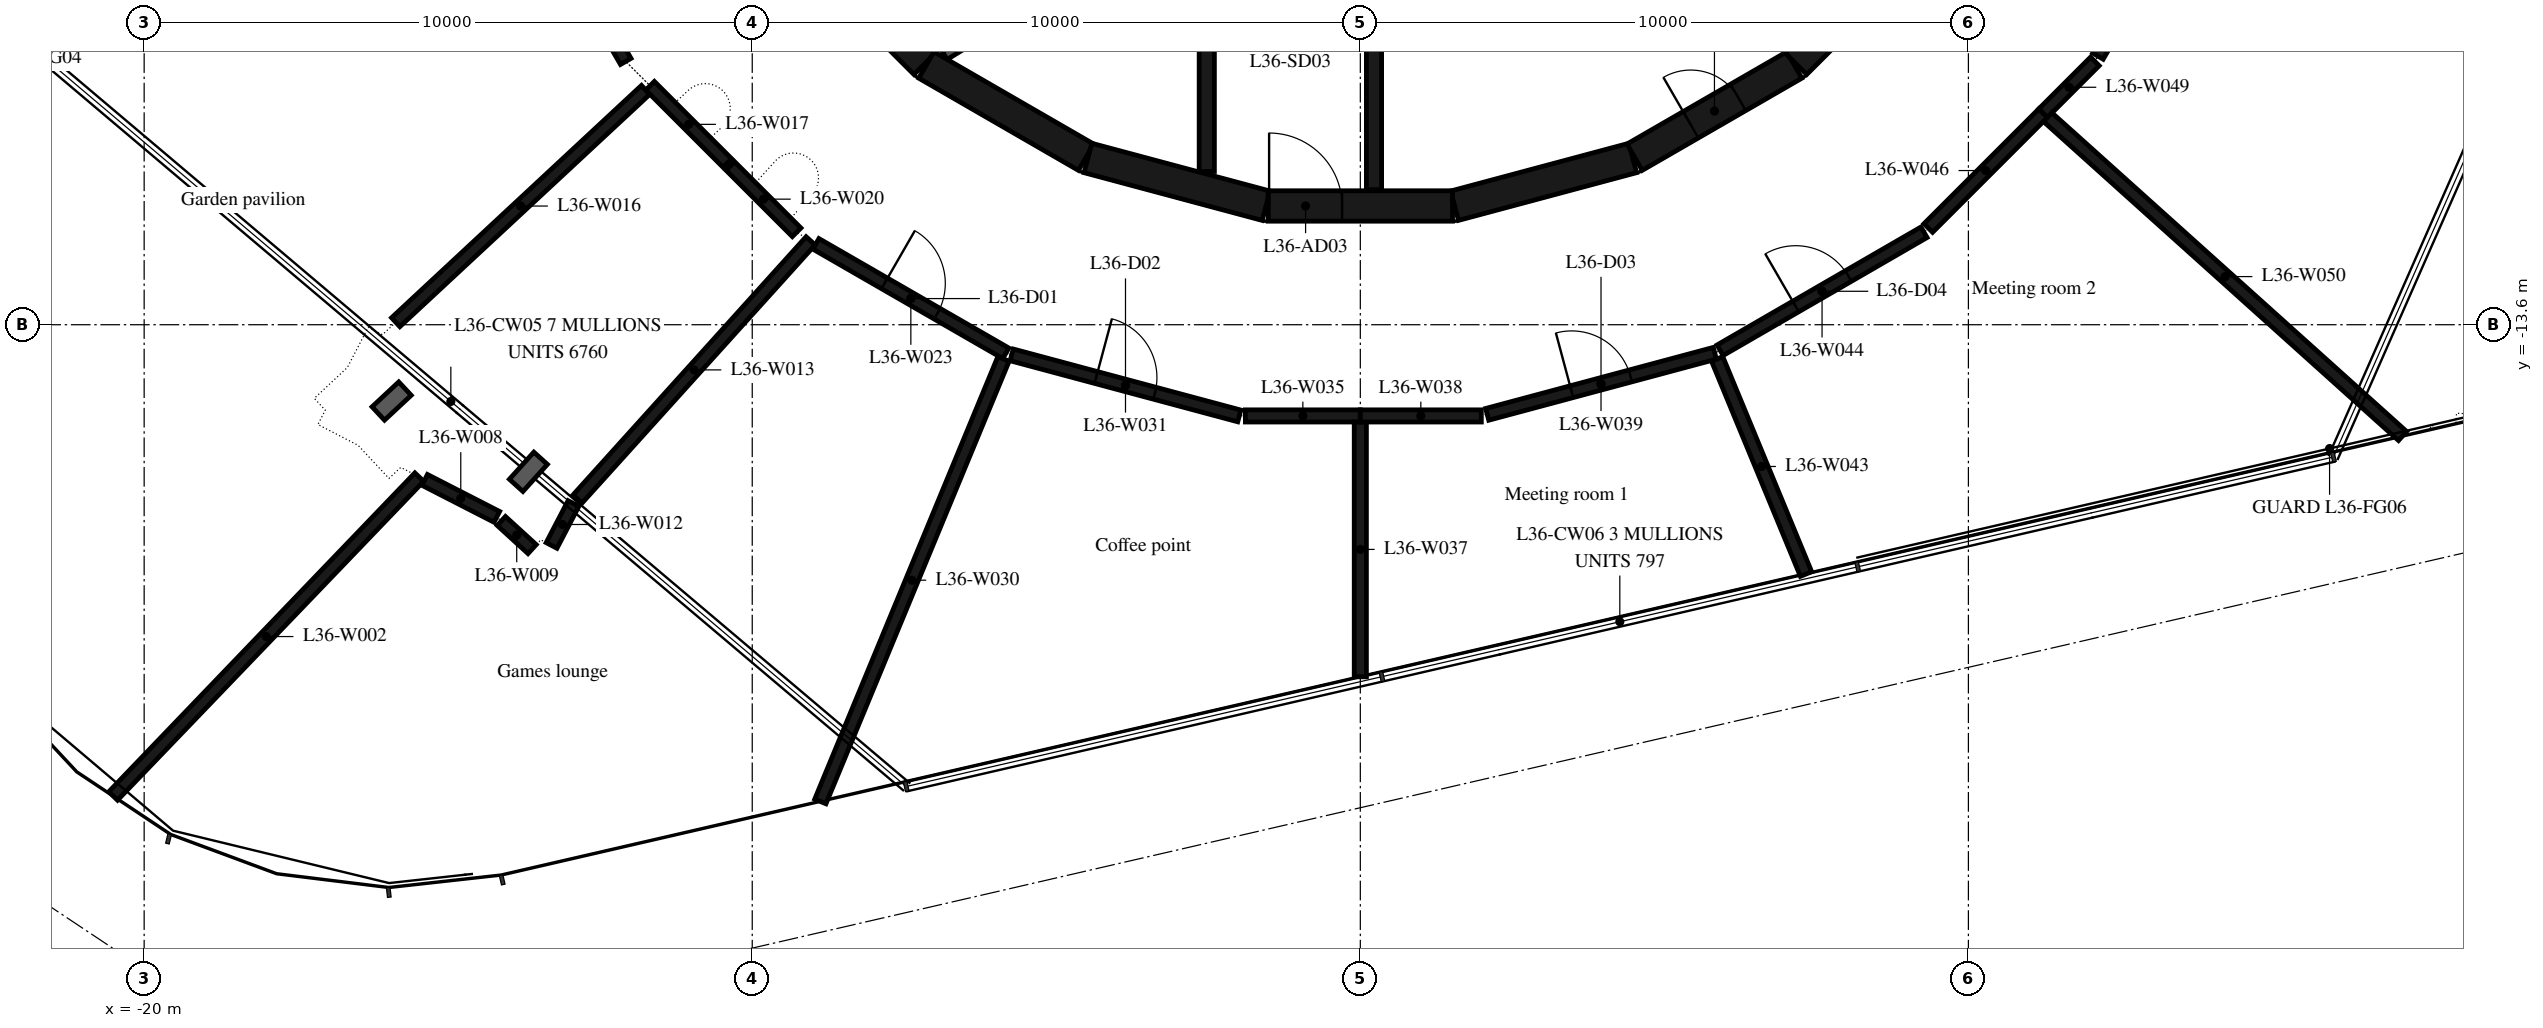
"""IFC4 building model, lengths in metres.
Left out: names, types, materials, properties, quantities, classifications, styles, units other than length and angle.
Written with IfcOpenShell. Run it as: python <this file> out.ifc"""

import sys

from ifc_helpers import new_model, si_unit, direction, frame, frame_2d, origin, place, context, subcontext, project, spatial, rectangle, extrude, element, fill, save


model = new_model("IFC4")
c1 = context("Model", 3, precision=1e-05, world=origin(), true_north=direction((0.0, 1.0)))
c2 = subcontext(c1, "Body", "Model", "MODEL_VIEW")
j1 = project(units=[si_unit("LENGTHUNIT", "METRE"), si_unit("PLANEANGLEUNIT", "RADIAN")], contexts=[c1])
p1 = place(None, origin())
s1 = spatial("IfcSite", under=j1, at=p1, CompositionType="ELEMENT")
p2 = place(p1, origin())
s2 = spatial("IfcBuilding", under=s1, at=p2, CompositionType="ELEMENT")
p3 = place(p2, frame((0.0, 0.0, 144.9)))
s3 = spatial("IfcBuildingStorey", under=s2, at=p3, CompositionType="ELEMENT", Elevation=144.9)
p4 = place(p3, frame((1.55, -11.643, 0.0), z_axis=(0.0, 0.0, 1.0), x_axis=(0.965948410781, 0.258734743916, 0.0)))
e1 = element("IfcWall", 1, at=p4, inside=s3, PredefinedType="SHEAR", context=c2, shape_type="SweptSolid", body=[
    extrude(rectangle(XDim=3.033, YDim=0.5, at=frame_2d((1.516, 0.0))), origin(), (0.0, 0.0, 1.0), 6.35),
])
p5 = place(p3, frame((4.51, -10.845, 0.0), z_axis=(0.0, 0.0, 1.0), x_axis=(0.865975092491, 0.500087131594, 0.0)))
e2 = element("IfcWall", 2, at=p5, inside=s3, PredefinedType="SHEAR", context=c2, shape_type="SweptSolid", body=[
    extrude(rectangle(XDim=3.033, YDim=0.5, at=frame_2d((1.516, 0.0))), origin(), (0.0, 0.0, 1.0), 6.35),
])
p6 = place(p5, frame((1.066, 0.0, 0.0)))
e3 = element("IfcOpeningElement", 3, at=p6, cuts=e2, PredefinedType="OPENING", context=c2, shape_type="SweptSolid", body=[
    extrude(rectangle(XDim=0.9, YDim=2.1, at=frame_2d((0.45, 1.05))), frame((0.0, 0.26, 0.0), z_axis=(0.0, -1.0, 0.0), x_axis=(1.0, 0.0, 0.0)), (0.0, 0.0, 1.0), 0.52),
])
for number, where, z_axis, x_axis in (
    (4, (7.164, -9.308, 0.0), (0.0, 0.0, 1.0), (0.707, 0.707, 0.0)),
    (5, (-9.308, -7.164, 0.0), (0.0, 0.0, 1.0), (0.707, -0.707, 0.0)),
):
    element("IfcWall", number, at=place(p3, frame(where, z_axis=z_axis, x_axis=x_axis)), inside=s3, PredefinedType="SHEAR", context=c2, shape_type="SweptSolid", body=[
        extrude(rectangle(XDim=3.032, YDim=0.5, at=frame_2d((1.516, 0.0))), origin(), (0.0, 0.0, 1.0), 6.35),
    ])
for number, where, z_axis, x_axis in (
    (6, (-7.137, -9.329, 0.0), (0.0, 0.0, 1.0), (0.866, -0.5, 0.0)),
    (7, (-4.479, -10.858, 0.0), (0.0, 0.0, 1.0), (0.966, -0.259, 0.0)),
):
    element("IfcWall", number, at=place(p3, frame(where, z_axis=z_axis, x_axis=x_axis)), inside=s3, PredefinedType="SHEAR", context=c2, shape_type="SweptSolid", body=[
        extrude(rectangle(XDim=3.033, YDim=0.5, at=frame_2d((1.516, 0.0))), origin(), (0.0, 0.0, 1.0), 6.35),
    ])
p7 = place(p3, frame((-1.516, -11.647, 0.0), z_axis=(0.0, 0.0, 1.0), x_axis=(1.0, 0.0, 0.0)))
e8 = element("IfcWall", 8, at=p7, inside=s3, PredefinedType="SHEAR", context=c2, shape_type="SweptSolid", body=[
    extrude(rectangle(XDim=3.033, YDim=0.5, at=frame_2d((1.516, 0.0))), origin(), (0.0, 0.0, 1.0), 6.35),
])
p8 = place(p7, frame((0.016, 0.0, 0.0)))
e9 = element("IfcOpeningElement", 9, at=p8, cuts=e8, PredefinedType="OPENING", context=c2, shape_type="SweptSolid", body=[
    extrude(rectangle(XDim=1.2, YDim=2.1, at=frame_2d((0.6, 1.05))), frame((0.0, 0.26, 0.0), z_axis=(0.0, -1.0, 0.0), x_axis=(1.0, 0.0, 0.0)), (0.0, 0.0, 1.0), 0.52),
])
p9 = place(p3, frame((-2.525, -8.97, 0.0), z_axis=(0.0, 0.0, 1.0), x_axis=(0.0, -1.0, 0.0)))
e10 = element("IfcWall", 10, at=p9, inside=s3, PredefinedType="SHEAR", context=c2, shape_type="SweptSolid", body=[
    extrude(rectangle(XDim=2.11, YDim=0.25, at=frame_2d((1.055, 0.0))), origin(), (0.0, 0.0, 1.0), 6.35),
])
p10 = place(p3, frame((0.225, -8.97, 0.0), z_axis=(0.0, 0.0, 1.0), x_axis=(0.0, -1.0, 0.0)))
e11 = element("IfcWall", 11, at=p10, inside=s3, PredefinedType="SHEAR", context=c2, shape_type="SweptSolid", body=[
    extrude(rectangle(XDim=2.41, YDim=0.25, at=frame_2d((1.205, 0.0))), origin(), (0.0, 0.0, 1.0), 6.35),
])
p11 = place(p3, frame((-2.451, -6.495, 0.0), z_axis=(0.0, 0.0, 1.0), x_axis=(-0.853250115418, -0.521501908471, 0.0)))
e12 = element("IfcWall", 12, at=p11, inside=s3, PredefinedType="PARTITIONING", context=c2, shape_type="SweptSolid", body=[
    extrude(rectangle(XDim=5.137, YDim=0.15, at=frame_2d((2.569, 0.0))), origin(), (0.0, 0.0, 1.0), 6.35),
])
p12 = place(p11, frame((2.119, 0.0, 0.0)))
e13 = element("IfcOpeningElement", 13, at=p12, cuts=e12, PredefinedType="OPENING", context=c2, shape_type="SweptSolid", body=[
    extrude(rectangle(XDim=0.9, YDim=2.1, at=frame_2d((0.45, 1.05))), frame((0.0, 0.085, 0.0), z_axis=(0.0, -1.0, 0.0), x_axis=(1.0, 0.0, 0.0)), (0.0, 0.0, 1.0), 0.17),
])
p13 = place(p3, frame((-15.476, -16.106, 0.0), z_axis=(0.0, 0.0, 1.0), x_axis=(-0.6925353236, -0.72138396542, 0.0)))
e14 = element("IfcWall", 14, at=p13, inside=s3, PredefinedType="PARTITIONING", context=c2, shape_type="SweptSolid", body=[
    extrude(rectangle(XDim=7.27, YDim=0.2, at=frame_2d((3.635, 0.0))), origin(), (0.0, 0.0, 1.0), 6.35),
])
p14 = place(p3, frame((-14.2, -16.76, 0.0), z_axis=(0.0, 0.0, 1.0), x_axis=(-0.88987844473, 0.456197713283, 0.0)))
e15 = element("IfcWall", 15, at=p14, inside=s3, PredefinedType="PARTITIONING", context=c2, shape_type="SweptSolid", body=[
    extrude(rectangle(XDim=1.334, YDim=0.2, at=frame_2d((0.667, 0.0))), origin(), (0.0, 0.0, 1.0), 6.35),
])
p15 = place(p3, frame((-14.126, -16.827, 0.0), z_axis=(0.0, 0.0, 1.0), x_axis=(0.73808453576, -0.674708246631, 0.0)))
e16 = element("IfcWall", 16, at=p15, inside=s3, PredefinedType="PARTITIONING", context=c2, shape_type="SweptSolid", body=[
    extrude(rectangle(XDim=0.686, YDim=0.2, at=frame_2d((0.343, 0.0))), origin(), (0.0, 0.0, 1.0), 6.35),
])
p16 = place(p3, frame((-14.02, -5.917, 0.0), z_axis=(0.0, 0.0, 1.0), x_axis=(0.500733182901, -0.865601686425, 0.0)))
e17 = element("IfcWall", 17, at=p16, inside=s3, PredefinedType="PARTITIONING", context=c2, shape_type="SweptSolid", body=[
    extrude(rectangle(XDim=3.874, YDim=0.2, at=frame_2d((1.937, 0.0))), origin(), (0.0, 0.0, 1.0), 6.35),
])
p17 = place(p16, frame((1.437, 0.0, 0.0)))
e18 = element("IfcOpeningElement", 18, at=p17, cuts=e17, PredefinedType="OPENING", context=c2, shape_type="SweptSolid", body=[
    extrude(rectangle(XDim=1.0, YDim=2.1, at=frame_2d((0.5, 1.05))), frame((0.0, 0.11, 0.0), z_axis=(0.0, -1.0, 0.0), x_axis=(1.0, 0.0, 0.0)), (0.0, 0.0, 1.0), 0.22),
])
p18 = place(p3, frame((-13.3, -17.23, 0.0), z_axis=(0.0, 0.0, 1.0), x_axis=(0.462705370769, 0.886512120538, 0.0)))
e19 = element("IfcWall", 19, at=p18, inside=s3, PredefinedType="PARTITIONING", context=c2, shape_type="SweptSolid", body=[
    extrude(rectangle(XDim=0.778, YDim=0.2, at=frame_2d((0.389, 0.0))), origin(), (0.0, 0.0, 1.0), 6.35),
])
p19 = place(p3, frame((-12.873, -16.466, 0.0), z_axis=(0.0, 0.0, 1.0), x_axis=(0.670098193638, 0.742272464048, 0.0)))
e20 = element("IfcWall", 20, at=p19, inside=s3, PredefinedType="PARTITIONING", context=c2, shape_type="SweptSolid", body=[
    extrude(rectangle(XDim=5.72, YDim=0.2, at=frame_2d((2.86, 0.0))), origin(), (0.0, 0.0, 1.0), 6.35),
])
p20 = place(p3, frame((-11.753, -9.738, 0.0), z_axis=(0.0, 0.0, 1.0), x_axis=(-0.732435443259, -0.680836486579, 0.0)))
e21 = element("IfcWall", 21, at=p20, inside=s3, PredefinedType="PARTITIONING", context=c2, shape_type="SweptSolid", body=[
    extrude(rectangle(XDim=5.612, YDim=0.2, at=frame_2d((2.806, 0.0))), origin(), (0.0, 0.0, 1.0), 6.35),
])
p21 = place(p3, frame((-11.68, -9.67, 0.0), z_axis=(0.0, 0.0, 1.0), x_axis=(0.707106781187, -0.707106781187, 0.0)))
e22 = element("IfcWall", 22, at=p21, inside=s3, PredefinedType="PARTITIONING", context=c2, shape_type="SweptSolid", body=[
    extrude(rectangle(XDim=1.796, YDim=0.2, at=frame_2d((0.898, 0.0))), origin(), (0.0, 0.0, 1.0), 6.35),
])
p22 = place(p3, frame((-10.36, -10.99, 0.0), z_axis=(0.0, 0.0, 1.0), x_axis=(0.707106781187, -0.707106781187, 0.0)))
e23 = element("IfcWall", 23, at=p22, inside=s3, PredefinedType="PARTITIONING", context=c2, shape_type="SweptSolid", body=[
    extrude(rectangle(XDim=1.542, YDim=0.2, at=frame_2d((0.771, 0.0))), origin(), (0.0, 0.0, 1.0), 6.35),
])
p23 = place(p3, frame((-8.953, -12.27, 0.0), z_axis=(0.0, 0.0, 1.0), x_axis=(0.866407617873, -0.499337400655, 0.0)))
e24 = element("IfcWall", 24, at=p23, inside=s3, PredefinedType="PARTITIONING", context=c2, shape_type="SweptSolid", body=[
    extrude(rectangle(XDim=3.605, YDim=0.2, at=frame_2d((1.802, 0.0))), origin(), (0.0, 0.0, 1.0), 6.35),
])
p24 = place(p23, frame((1.302, 0.0, 0.0)))
e25 = element("IfcOpeningElement", 25, at=p24, cuts=e24, PredefinedType="OPENING", context=c2, shape_type="SweptSolid", body=[
    extrude(rectangle(XDim=1.0, YDim=2.1, at=frame_2d((0.5, 1.05))), frame((0.0, 0.11, 0.0), z_axis=(0.0, -1.0, 0.0), x_axis=(1.0, 0.0, 0.0)), (0.0, 0.0, 1.0), 0.22),
])
p25 = place(p3, frame((-5.868, -14.162, 0.0), z_axis=(0.0, 0.0, 1.0), x_axis=(-0.382384646644, -0.924003237013, 0.0)))
e26 = element("IfcWall", 26, at=p25, inside=s3, PredefinedType="PARTITIONING", context=c2, shape_type="SweptSolid", body=[
    extrude(rectangle(XDim=7.876, YDim=0.2, at=frame_2d((3.938, 0.0))), origin(), (0.0, 0.0, 1.0), 6.35),
])
p26 = place(p3, frame((-5.733, -14.096, 0.0), z_axis=(0.0, 0.0, 1.0), x_axis=(0.96585437197, -0.259085569159, 0.0)))
e27 = element("IfcWall", 27, at=p26, inside=s3, PredefinedType="PARTITIONING", context=c2, shape_type="SweptSolid", body=[
    extrude(rectangle(XDim=3.876, YDim=0.2, at=frame_2d((1.938, 0.0))), origin(), (0.0, 0.0, 1.0), 6.35),
])
p27 = place(p26, frame((1.438, 0.0, 0.0)))
e28 = element("IfcOpeningElement", 28, at=p27, cuts=e27, PredefinedType="OPENING", context=c2, shape_type="SweptSolid", body=[
    extrude(rectangle(XDim=1.0, YDim=2.1, at=frame_2d((0.5, 1.05))), frame((0.0, 0.11, 0.0), z_axis=(0.0, -1.0, 0.0), x_axis=(1.0, 0.0, 0.0)), (0.0, 0.0, 1.0), 0.22),
])
p28 = place(p3, frame((-1.89, -15.1, 0.0), z_axis=(0.0, 0.0, 1.0), x_axis=(1.0, 0.0, 0.0)))
e29 = element("IfcWall", 29, at=p28, inside=s3, PredefinedType="PARTITIONING", context=c2, shape_type="SweptSolid", body=[
    extrude(rectangle(XDim=1.89, YDim=0.2, at=frame_2d((0.945, 0.0))), origin(), (0.0, 0.0, 1.0), 6.35),
])
p29 = place(p3, frame((0.0, -15.2, 0.0), z_axis=(0.0, 0.0, 1.0), x_axis=(0.0, -1.0, 0.0)))
e30 = element("IfcWall", 30, at=p29, inside=s3, PredefinedType="PARTITIONING", context=c2, shape_type="SweptSolid", body=[
    extrude(rectangle(XDim=4.19, YDim=0.2, at=frame_2d((2.095, 0.0))), origin(), (0.0, 0.0, 1.0), 6.35),
])
p30 = place(p3, frame((0.0, -15.1, 0.0), z_axis=(0.0, 0.0, 1.0), x_axis=(1.0, 0.0, 0.0)))
e31 = element("IfcWall", 31, at=p30, inside=s3, PredefinedType="PARTITIONING", context=c2, shape_type="SweptSolid", body=[
    extrude(rectangle(XDim=1.99, YDim=0.2, at=frame_2d((0.995, 0.0))), origin(), (0.0, 0.0, 1.0), 6.35),
])
p31 = place(p3, frame((2.087, -15.074, 0.0), z_axis=(0.0, 0.0, 1.0), x_axis=(0.965870133458, 0.259026804199, 0.0)))
e32 = element("IfcWall", 32, at=p31, inside=s3, PredefinedType="PARTITIONING", context=c2, shape_type="SweptSolid", body=[
    extrude(rectangle(XDim=3.876, YDim=0.2, at=frame_2d((1.938, 0.0))), origin(), (0.0, 0.0, 1.0), 6.35),
])
p32 = place(p31, frame((1.438, 0.0, 0.0)))
e33 = element("IfcOpeningElement", 33, at=p32, cuts=e32, PredefinedType="OPENING", context=c2, shape_type="SweptSolid", body=[
    extrude(rectangle(XDim=1.0, YDim=2.1, at=frame_2d((0.5, 1.05))), frame((0.0, 0.11, 0.0), z_axis=(0.0, -1.0, 0.0), x_axis=(1.0, 0.0, 0.0)), (0.0, 0.0, 1.0), 0.22),
])
p33 = place(p3, frame((5.868, -14.162, 0.0), z_axis=(0.0, 0.0, 1.0), x_axis=(0.381923606239, -0.924193896862, 0.0)))
e34 = element("IfcWall", 34, at=p33, inside=s3, PredefinedType="PARTITIONING", context=c2, shape_type="SweptSolid", body=[
    extrude(rectangle(XDim=3.828, YDim=0.2, at=frame_2d((1.914, 0.0))), origin(), (0.0, 0.0, 1.0), 6.35),
])
p34 = place(p3, frame((5.917, -14.02, 0.0), z_axis=(0.0, 0.0, 1.0), x_axis=(0.865601686425, 0.500733182901, 0.0)))
e35 = element("IfcWall", 35, at=p34, inside=s3, PredefinedType="PARTITIONING", context=c2, shape_type="SweptSolid", body=[
    extrude(rectangle(XDim=3.874, YDim=0.2, at=frame_2d((1.937, 0.0))), origin(), (0.0, 0.0, 1.0), 6.35),
])
p35 = place(p34, frame((1.437, 0.0, 0.0)))
e36 = element("IfcOpeningElement", 36, at=p35, cuts=e35, PredefinedType="OPENING", context=c2, shape_type="SweptSolid", body=[
    extrude(rectangle(XDim=1.0, YDim=2.1, at=frame_2d((0.5, 1.05))), frame((0.0, 0.11, 0.0), z_axis=(0.0, -1.0, 0.0), x_axis=(1.0, 0.0, 0.0)), (0.0, 0.0, 1.0), 0.22),
])
p36 = place(p3, frame((9.341, -12.009, 0.0), z_axis=(0.0, 0.0, 1.0), x_axis=(0.707106781187, 0.707106781187, 0.0)))
e37 = element("IfcWall", 37, at=p36, inside=s3, PredefinedType="PARTITIONING", context=c2, shape_type="SweptSolid", body=[
    extrude(rectangle(XDim=2.672, YDim=0.2, at=frame_2d((1.336, 0.0))), origin(), (0.0, 0.0, 1.0), 6.35),
])
p37 = place(p3, frame((11.23, -10.12, 0.0), z_axis=(0.0, 0.0, 1.0), x_axis=(0.707106781187, 0.707106781187, 0.0)))
e38 = element("IfcWall", 38, at=p37, inside=s3, PredefinedType="PARTITIONING", context=c2, shape_type="SweptSolid", body=[
    extrude(rectangle(XDim=1.202, YDim=0.2, at=frame_2d((0.601, 0.0))), origin(), (0.0, 0.0, 1.0), 6.35),
])
p38 = place(p3, frame((11.304, -10.187, 0.0), z_axis=(0.0, 0.0, 1.0), x_axis=(0.743847874898, -0.668348964995, 0.0)))
e39 = element("IfcWall", 39, at=p38, inside=s3, PredefinedType="PARTITIONING", context=c2, shape_type="SweptSolid", body=[
    extrude(rectangle(XDim=7.845, YDim=0.2, at=frame_2d((3.922, 0.0))), origin(), (0.0, 0.0, 1.0), 6.35),
])
p39 = place(p3, frame((12.13, -9.183, 0.0), z_axis=(0.0, 0.0, 1.0), x_axis=(0.500760497952, 0.865585884642, 0.0)))
e40 = element("IfcWall", 40, at=p39, inside=s3, PredefinedType="PARTITIONING", context=c2, shape_type="SweptSolid", body=[
    extrude(rectangle(XDim=3.874, YDim=0.2, at=frame_2d((1.937, 0.0))), origin(), (0.0, 0.0, 1.0), 6.35),
])
p40 = place(p39, frame((1.437, 0.0, 0.0)))
e41 = element("IfcOpeningElement", 41, at=p40, cuts=e40, PredefinedType="OPENING", context=c2, shape_type="SweptSolid", body=[
    extrude(rectangle(XDim=1.0, YDim=2.1, at=frame_2d((0.5, 1.05))), frame((0.0, 0.11, 0.0), z_axis=(0.0, -1.0, 0.0), x_axis=(1.0, 0.0, 0.0)), (0.0, 0.0, 1.0), 0.22),
])
p41 = place(p8, origin())
e42 = element("IfcDoor", 42, at=p41, inside=s3, OperationType="SINGLE_SWING_RIGHT", PredefinedType="DOOR", context=c2, shape_type="SweptSolid", body=[
    extrude(rectangle(XDim=1.2, YDim=2.1, at=frame_2d((0.6, 1.05))), frame((0.0, 0.025, 0.0), z_axis=(0.0, -1.0, 0.0), x_axis=(1.0, 0.0, 0.0)), (0.0, 0.0, 1.0), 0.05),
])
fill(e9, e42)
p42 = place(p6, origin())
e43 = element("IfcDoor", 43, at=p42, inside=s3, OperationType="SINGLE_SWING_LEFT", PredefinedType="DOOR", context=c2, shape_type="SweptSolid", body=[
    extrude(rectangle(XDim=0.9, YDim=2.1, at=frame_2d((0.45, 1.05))), frame((0.0, 0.025, 0.0), z_axis=(0.0, -1.0, 0.0), x_axis=(1.0, 0.0, 0.0)), (0.0, 0.0, 1.0), 0.05),
])
fill(e3, e43)
p43 = place(p24, origin())
e44 = element("IfcDoor", 44, at=p43, inside=s3, OperationType="SINGLE_SWING_LEFT", PredefinedType="DOOR", context=c2, shape_type="SweptSolid", body=[
    extrude(rectangle(XDim=1.0, YDim=2.1, at=frame_2d((0.5, 1.05))), frame((0.0, 0.025, 0.0), z_axis=(0.0, -1.0, 0.0), x_axis=(1.0, 0.0, 0.0)), (0.0, 0.0, 1.0), 0.05),
])
fill(e25, e44)
p44 = place(p27, origin())
e45 = element("IfcDoor", 45, at=p44, inside=s3, OperationType="SINGLE_SWING_LEFT", PredefinedType="DOOR", context=c2, shape_type="SweptSolid", body=[
    extrude(rectangle(XDim=1.0, YDim=2.1, at=frame_2d((0.5, 1.05))), frame((0.0, 0.025, 0.0), z_axis=(0.0, -1.0, 0.0), x_axis=(1.0, 0.0, 0.0)), (0.0, 0.0, 1.0), 0.05),
])
fill(e28, e45)
p45 = place(p32, origin())
e46 = element("IfcDoor", 46, at=p45, inside=s3, OperationType="SINGLE_SWING_LEFT", PredefinedType="DOOR", context=c2, shape_type="SweptSolid", body=[
    extrude(rectangle(XDim=1.0, YDim=2.1, at=frame_2d((0.5, 1.05))), frame((0.0, 0.025, 0.0), z_axis=(0.0, -1.0, 0.0), x_axis=(1.0, 0.0, 0.0)), (0.0, 0.0, 1.0), 0.05),
])
fill(e33, e46)
p46 = place(p35, origin())
e47 = element("IfcDoor", 47, at=p46, inside=s3, OperationType="SINGLE_SWING_LEFT", PredefinedType="DOOR", context=c2, shape_type="SweptSolid", body=[
    extrude(rectangle(XDim=1.0, YDim=2.1, at=frame_2d((0.5, 1.05))), frame((0.0, 0.025, 0.0), z_axis=(0.0, -1.0, 0.0), x_axis=(1.0, 0.0, 0.0)), (0.0, 0.0, 1.0), 0.05),
])
fill(e36, e47)
save(model, sys.argv[1])
